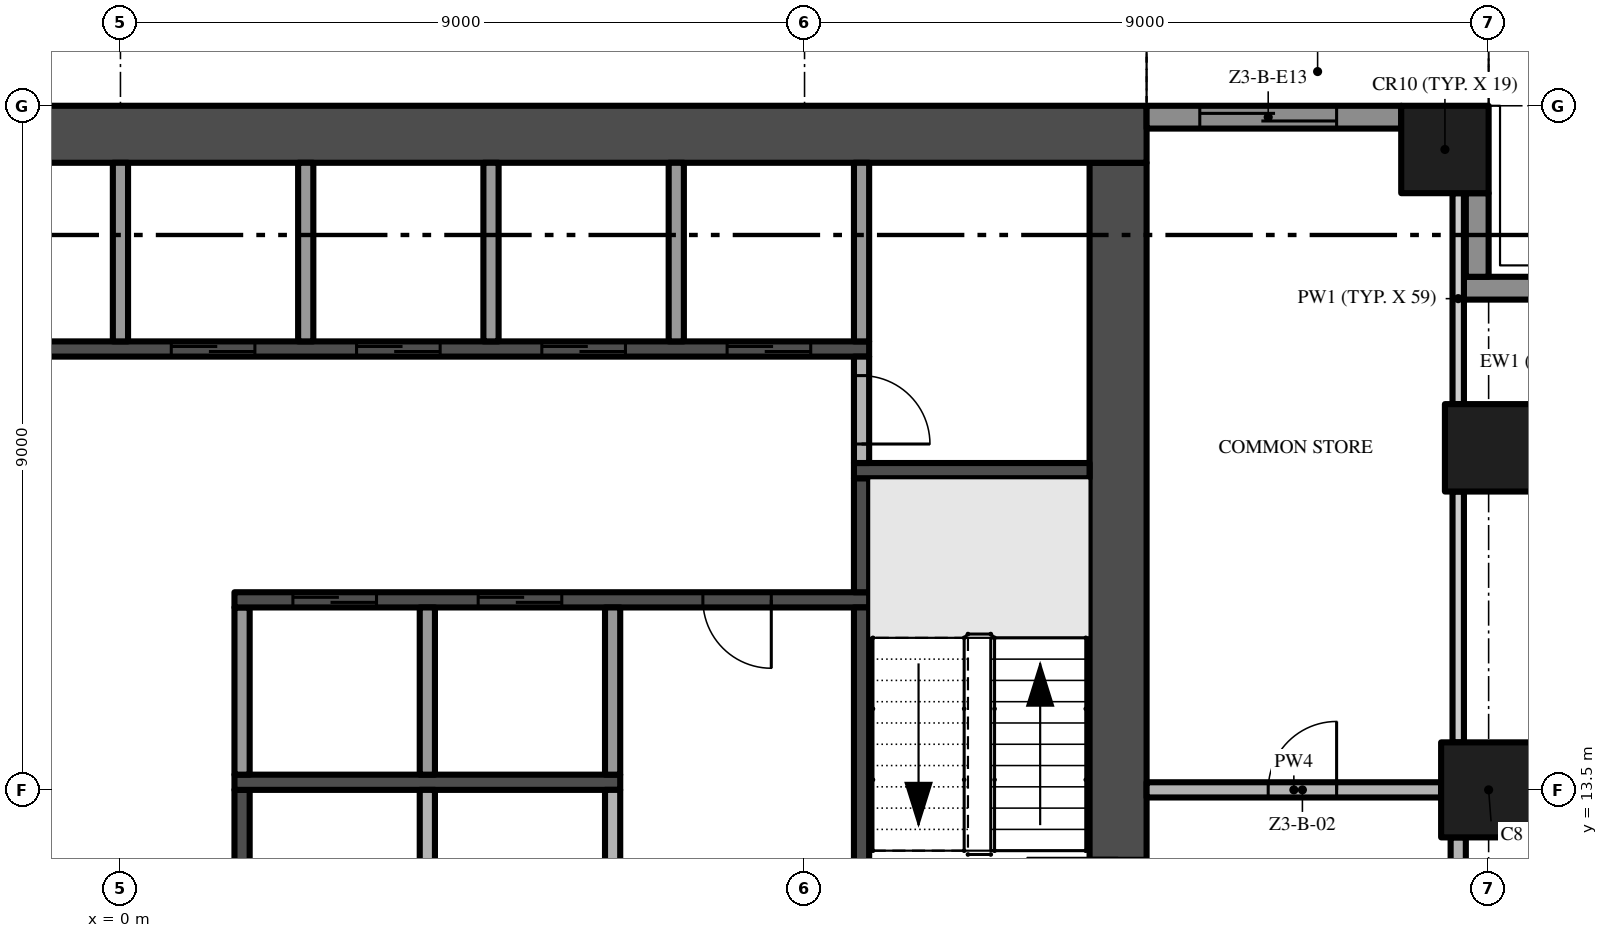
"""IFC4 building model, lengths in metres.
Left out: names, types, materials, properties, quantities, classifications, styles, units other than length and angle.
Written with IfcOpenShell. Run it as: python <this file> out.ifc"""

import sys

from ifc_helpers import new_model, si_unit, direction, frame, frame_2d, origin, origin_2d, place, context, subcontext, project, spatial, rectangle, extrude, element, fill, save


model = new_model("IFC4")
c1 = context("Model", 3, precision=1e-05, world=origin(), true_north=direction((0.0, 1.0)))
c2 = subcontext(c1, "Body", "Model", "MODEL_VIEW")
j1 = project(units=[si_unit("LENGTHUNIT", "METRE"), si_unit("PLANEANGLEUNIT", "RADIAN")], contexts=[c1])
p1 = place(None, origin())
s1 = spatial("IfcSite", under=j1, at=p1, CompositionType="ELEMENT")
p2 = place(p1, origin())
s2 = spatial("IfcBuilding", under=s1, at=p2, CompositionType="ELEMENT")
p3 = place(p2, frame((0.0, 0.0, 140.2)))
s3 = spatial("IfcBuildingStorey", under=s2, at=p3, CompositionType="ELEMENT", Elevation=140.2)
p4 = place(p3, frame((13.125, 5.25, -0.3), z_axis=(0.0, 0.0, 1.0), x_axis=(0.0, 1.0, 0.0)))
e1 = element("IfcWall", 1, at=p4, inside=s3, PredefinedType="SHEAR", context=c2, shape_type="SweptSolid", body=[
    extrude(rectangle(XDim=16.5, YDim=0.75, at=frame_2d((8.25, 0.0))), origin(), (0.0, 0.0, 1.0), 3.8),
])
p5 = place(p4, frame((6.15, 0.0, 0.3)))
e2 = element("IfcOpeningElement", 2, at=p5, cuts=e1, PredefinedType="OPENING", context=c2, shape_type="SweptSolid", body=[
    extrude(rectangle(XDim=1.2, YDim=2.2, at=frame_2d((0.6, 1.1))), frame((0.0, 0.385, 0.0), z_axis=(0.0, -1.0, 0.0), x_axis=(1.0, 0.0, 0.0)), (0.0, 0.0, 1.0), 0.77),
])
p6 = place(p3, frame((13.5, 22.125, -0.3), z_axis=(0.0, 0.0, 1.0), x_axis=(-1.0, 0.0, 0.0)))
e3 = element("IfcWall", 3, at=p6, inside=s3, PredefinedType="SHEAR", context=c2, shape_type="SweptSolid", body=[
    extrude(rectangle(XDim=27.0, YDim=0.75, at=frame_2d((13.5, 0.0))), origin(), (0.0, 0.0, 1.0), 3.8),
])
p7 = place(p3, frame((18.0, 13.5, 0.0), z_axis=(0.0, 0.0, 1.0), x_axis=(1.0, 0.0, 0.0)))
e4 = element("IfcColumn", 4, at=p7, inside=s3, PredefinedType="COLUMN", context=c2, shape_type="SweptSolid", body=[
    extrude(rectangle(XDim=1.25, YDim=1.25, at=origin_2d()), origin(), (0.0, 0.0, 1.0), 3.5),
])
for number, where, z_axis, x_axis in (
    (5, (17.425, 21.925, 0.0), (0.0, 0.0, 1.0), (1.0, 0.0, 0.0)),
    (6, (18.0, 18.0, 0.0), (0.0, 0.0, 1.0), (1.0, 0.0, 0.0)),
):
    element("IfcColumn", number, at=place(p3, frame(where, z_axis=z_axis, x_axis=x_axis)), inside=s3, PredefinedType="COLUMN", context=c2, shape_type="SweptSolid", body=[
        extrude(rectangle(XDim=1.15, YDim=1.15, at=origin_2d()), origin(), (0.0, 0.0, 1.0), 3.5),
    ])
p8 = place(p3, frame((17.6, 20.1, 0.0), z_axis=(0.0, 0.0, 1.0), x_axis=(1.0, 0.0, 0.0)))
e7 = element("IfcWall", 7, at=p8, inside=s3, PredefinedType="SOLIDWALL", context=c2, shape_type="SweptSolid", body=[
    extrude(rectangle(XDim=2.35, YDim=0.3, at=frame_2d((1.175, 0.0))), origin(), (0.0, 0.0, 1.0), 3.5),
])
p9 = place(p3, frame((17.85, 21.35, 0.0), z_axis=(0.0, 0.0, 1.0), x_axis=(0.0, -1.0, 0.0)))
e8 = element("IfcWall", 8, at=p9, inside=s3, PredefinedType="SOLIDWALL", context=c2, shape_type="SweptSolid", body=[
    extrude(rectangle(XDim=1.1, YDim=0.3, at=frame_2d((0.55, 0.0))), origin(), (0.0, 0.0, 1.0), 3.5),
])
p10 = place(p3, frame((13.5, 22.35, 0.0), z_axis=(0.0, 0.0, 1.0), x_axis=(1.0, 0.0, 0.0)))
e9 = element("IfcWall", 9, at=p10, inside=s3, PredefinedType="SOLIDWALL", context=c2, shape_type="SweptSolid", body=[
    extrude(rectangle(XDim=3.35, YDim=0.3, at=frame_2d((1.675, 0.0))), origin(), (0.0, 0.0, 1.0), 3.5),
])
p11 = place(p10, frame((0.7, 0.0, 0.0)))
e10 = element("IfcOpeningElement", 10, at=p11, cuts=e9, PredefinedType="OPENING", context=c2, shape_type="SweptSolid", body=[
    extrude(rectangle(XDim=1.8, YDim=2.4, at=frame_2d((0.9, 1.2))), frame((0.0, 0.16, 0.0), z_axis=(0.0, -1.0, 0.0), x_axis=(1.0, 0.0, 0.0)), (0.0, 0.0, 1.0), 0.32),
])
p12 = place(p3, frame((-9.85, 19.3, 0.0), z_axis=(0.0, 0.0, 1.0), x_axis=(1.0, 0.0, 0.0)))
e11 = element("IfcWall", 11, at=p12, inside=s3, PredefinedType="SHEAR", context=c2, shape_type="SweptSolid", body=[
    extrude(rectangle(XDim=19.7, YDim=0.2, at=frame_2d((9.85, 0.0))), origin(), (0.0, 0.0, 1.0), 3.5),
])
p13 = place(p12, frame((10.519, 0.0, 0.0)))
e12 = element("IfcOpeningElement", 12, at=p13, cuts=e11, PredefinedType="OPENING", context=c2, shape_type="SweptSolid", body=[
    extrude(rectangle(XDim=1.1, YDim=2.1, at=frame_2d((0.55, 1.05))), frame((0.0, 0.11, 0.0), z_axis=(0.0, -1.0, 0.0), x_axis=(1.0, 0.0, 0.0)), (0.0, 0.0, 1.0), 0.22),
])
p14 = place(p12, frame((12.956, 0.0, 0.0)))
e13 = element("IfcOpeningElement", 13, at=p14, cuts=e11, PredefinedType="OPENING", context=c2, shape_type="SweptSolid", body=[
    extrude(rectangle(XDim=1.1, YDim=2.1, at=frame_2d((0.55, 1.05))), frame((0.0, 0.11, 0.0), z_axis=(0.0, -1.0, 0.0), x_axis=(1.0, 0.0, 0.0)), (0.0, 0.0, 1.0), 0.22),
])
p15 = place(p12, frame((15.394, 0.0, 0.0)))
e14 = element("IfcOpeningElement", 14, at=p15, cuts=e11, PredefinedType="OPENING", context=c2, shape_type="SweptSolid", body=[
    extrude(rectangle(XDim=1.1, YDim=2.1, at=frame_2d((0.55, 1.05))), frame((0.0, 0.11, 0.0), z_axis=(0.0, -1.0, 0.0), x_axis=(1.0, 0.0, 0.0)), (0.0, 0.0, 1.0), 0.22),
])
p16 = place(p12, frame((17.831, 0.0, 0.0)))
e15 = element("IfcOpeningElement", 15, at=p16, cuts=e11, PredefinedType="OPENING", context=c2, shape_type="SweptSolid", body=[
    extrude(rectangle(XDim=1.1, YDim=2.1, at=frame_2d((0.55, 1.05))), frame((0.0, 0.11, 0.0), z_axis=(0.0, -1.0, 0.0), x_axis=(1.0, 0.0, 0.0)), (0.0, 0.0, 1.0), 0.22),
])
p17 = place(p12, frame((2.087, 0.0, 0.0)))
e16 = element("IfcOpeningElement", 16, at=p17, cuts=e11, PredefinedType="OPENING", context=c2, shape_type="SweptSolid", body=[
    extrude(rectangle(XDim=0.9, YDim=2.1, at=frame_2d((0.45, 1.05))), frame((0.0, 0.11, 0.0), z_axis=(0.0, -1.0, 0.0), x_axis=(1.0, 0.0, 0.0)), (0.0, 0.0, 1.0), 0.22),
])
p18 = place(p12, frame((6.963, 0.0, 0.0)))
e17 = element("IfcOpeningElement", 17, at=p18, cuts=e11, PredefinedType="OPENING", context=c2, shape_type="SweptSolid", body=[
    extrude(rectangle(XDim=0.9, YDim=2.1, at=frame_2d((0.45, 1.05))), frame((0.0, 0.11, 0.0), z_axis=(0.0, -1.0, 0.0), x_axis=(1.0, 0.0, 0.0)), (0.0, 0.0, 1.0), 0.22),
])
p19 = place(p3, frame((0.0, 19.4, 0.0), z_axis=(0.0, 0.0, 1.0), x_axis=(0.0, 1.0, 0.0)))
e18 = element("IfcWall", 18, at=p19, inside=s3, PredefinedType="PARTITIONING", context=c2, shape_type="SweptSolid", body=[
    extrude(rectangle(XDim=2.35, YDim=0.2, at=frame_2d((1.175, 0.0))), origin(), (0.0, 0.0, 1.0), 3.5),
])
p20 = place(p3, frame((1.6, 13.5, 0.0), z_axis=(0.0, 0.0, 1.0), x_axis=(0.0, -1.0, 0.0)))
e19 = element("IfcWall", 19, at=p20, inside=s3, PredefinedType="SHEAR", context=c2, shape_type="SweptSolid", body=[
    extrude(rectangle(XDim=3.5, YDim=0.2, at=frame_2d((1.75, 0.0))), origin(), (0.0, 0.0, 1.0), 3.5),
])
p21 = place(p20, frame((1.3, 0.0, 0.0)))
e20 = element("IfcOpeningElement", 20, at=p21, cuts=e19, PredefinedType="OPENING", context=c2, shape_type="SweptSolid", body=[
    extrude(rectangle(XDim=0.9, YDim=2.1, at=frame_2d((0.45, 1.05))), frame((0.0, 0.11, 0.0), z_axis=(0.0, -1.0, 0.0), x_axis=(1.0, 0.0, 0.0)), (0.0, 0.0, 1.0), 0.22),
])
p22 = place(p3, frame((1.5, 13.6, 0.0), z_axis=(0.0, 0.0, 1.0), x_axis=(1.0, 0.0, 0.0)))
e21 = element("IfcWall", 21, at=p22, inside=s3, PredefinedType="SHEAR", context=c2, shape_type="SweptSolid", body=[
    extrude(rectangle(XDim=5.075, YDim=0.2, at=frame_2d((2.538, 0.0))), origin(), (0.0, 0.0, 1.0), 3.5),
])
p23 = place(p3, frame((1.6, 13.7, 0.0), z_axis=(0.0, 0.0, 1.0), x_axis=(0.0, 1.0, 0.0)))
e22 = element("IfcWall", 22, at=p23, inside=s3, PredefinedType="PARTITIONING", context=c2, shape_type="SweptSolid", body=[
    extrude(rectangle(XDim=2.2, YDim=0.2, at=frame_2d((1.1, 0.0))), origin(), (0.0, 0.0, 1.0), 3.5),
])
p24 = place(p3, frame((9.85, 16.0, 0.0), z_axis=(0.0, 0.0, 1.0), x_axis=(-1.0, 0.0, 0.0)))
e23 = element("IfcWall", 23, at=p24, inside=s3, PredefinedType="SHEAR", context=c2, shape_type="SweptSolid", body=[
    extrude(rectangle(XDim=8.35, YDim=0.2, at=frame_2d((4.175, 0.0))), origin(), (0.0, 0.0, 1.0), 3.5),
])
p25 = place(p24, frame((6.481, 0.0, 0.0)))
e24 = element("IfcOpeningElement", 24, at=p25, cuts=e23, PredefinedType="OPENING", context=c2, shape_type="SweptSolid", body=[
    extrude(rectangle(XDim=1.1, YDim=2.1, at=frame_2d((0.55, 1.05))), frame((0.0, 0.11, 0.0), z_axis=(0.0, -1.0, 0.0), x_axis=(1.0, 0.0, 0.0)), (0.0, 0.0, 1.0), 0.22),
])
p26 = place(p24, frame((4.044, 0.0, 0.0)))
e25 = element("IfcOpeningElement", 25, at=p26, cuts=e23, PredefinedType="OPENING", context=c2, shape_type="SweptSolid", body=[
    extrude(rectangle(XDim=1.1, YDim=2.1, at=frame_2d((0.55, 1.05))), frame((0.0, 0.11, 0.0), z_axis=(0.0, -1.0, 0.0), x_axis=(1.0, 0.0, 0.0)), (0.0, 0.0, 1.0), 0.22),
])
p27 = place(p24, frame((1.288, 0.0, 0.0)))
e26 = element("IfcOpeningElement", 26, at=p27, cuts=e23, PredefinedType="OPENING", context=c2, shape_type="SweptSolid", body=[
    extrude(rectangle(XDim=0.9, YDim=2.1, at=frame_2d((0.45, 1.05))), frame((0.0, 0.11, 0.0), z_axis=(0.0, -1.0, 0.0), x_axis=(1.0, 0.0, 0.0)), (0.0, 0.0, 1.0), 0.22),
])
p28 = place(p3, frame((2.438, 19.4, 0.0), z_axis=(0.0, 0.0, 1.0), x_axis=(0.0, 1.0, 0.0)))
e27 = element("IfcWall", 27, at=p28, inside=s3, PredefinedType="PARTITIONING", context=c2, shape_type="SweptSolid", body=[
    extrude(rectangle(XDim=2.35, YDim=0.2, at=frame_2d((1.175, 0.0))), origin(), (0.0, 0.0, 1.0), 3.5),
])
p29 = place(p3, frame((4.037, 10.0, 0.0), z_axis=(0.0, 0.0, 1.0), x_axis=(0.0, 1.0, 0.0)))
e28 = element("IfcWall", 28, at=p29, inside=s3, PredefinedType="PARTITIONING", context=c2, shape_type="SweptSolid", body=[
    extrude(rectangle(XDim=3.5, YDim=0.2, at=frame_2d((1.75, 0.0))), origin(), (0.0, 0.0, 1.0), 3.5),
])
p30 = place(p3, frame((4.037, 13.7, 0.0), z_axis=(0.0, 0.0, 1.0), x_axis=(0.0, 1.0, 0.0)))
e29 = element("IfcWall", 29, at=p30, inside=s3, PredefinedType="PARTITIONING", context=c2, shape_type="SweptSolid", body=[
    extrude(rectangle(XDim=2.2, YDim=0.2, at=frame_2d((1.1, 0.0))), origin(), (0.0, 0.0, 1.0), 3.5),
])
p31 = place(p3, frame((4.875, 19.4, 0.0), z_axis=(0.0, 0.0, 1.0), x_axis=(0.0, 1.0, 0.0)))
e30 = element("IfcWall", 30, at=p31, inside=s3, PredefinedType="PARTITIONING", context=c2, shape_type="SweptSolid", body=[
    extrude(rectangle(XDim=2.35, YDim=0.2, at=frame_2d((1.175, 0.0))), origin(), (0.0, 0.0, 1.0), 3.5),
])
p32 = place(p3, frame((6.475, 12.3, 0.0), z_axis=(0.0, 0.0, 1.0), x_axis=(0.0, 1.0, 0.0)))
e31 = element("IfcWall", 31, at=p32, inside=s3, PredefinedType="PARTITIONING", context=c2, shape_type="SweptSolid", body=[
    extrude(rectangle(XDim=1.2, YDim=0.2, at=frame_2d((0.6, 0.0))), origin(), (0.0, 0.0, 1.0), 3.5),
])
p33 = place(p3, frame((6.475, 13.7, 0.0), z_axis=(0.0, 0.0, 1.0), x_axis=(0.0, 1.0, 0.0)))
e32 = element("IfcWall", 32, at=p33, inside=s3, PredefinedType="PARTITIONING", context=c2, shape_type="SweptSolid", body=[
    extrude(rectangle(XDim=2.2, YDim=0.2, at=frame_2d((1.1, 0.0))), origin(), (0.0, 0.0, 1.0), 3.5),
])
p34 = place(p3, frame((7.312, 19.4, 0.0), z_axis=(0.0, 0.0, 1.0), x_axis=(0.0, 1.0, 0.0)))
e33 = element("IfcWall", 33, at=p34, inside=s3, PredefinedType="PARTITIONING", context=c2, shape_type="SweptSolid", body=[
    extrude(rectangle(XDim=2.35, YDim=0.2, at=frame_2d((1.175, 0.0))), origin(), (0.0, 0.0, 1.0), 3.5),
])
p35 = place(p3, frame((9.75, 12.3, 0.0), z_axis=(0.0, 0.0, 1.0), x_axis=(0.0, 1.0, 0.0)))
e34 = element("IfcWall", 34, at=p35, inside=s3, PredefinedType="SHEAR", context=c2, shape_type="SweptSolid", body=[
    extrude(rectangle(XDim=3.6, YDim=0.2, at=frame_2d((1.8, 0.0))), origin(), (0.0, 0.0, 1.0), 3.5),
])
p36 = place(p3, frame((9.75, 16.1, 0.0), z_axis=(0.0, 0.0, 1.0), x_axis=(0.0, 1.0, 0.0)))
e35 = element("IfcWall", 35, at=p36, inside=s3, PredefinedType="SHEAR", context=c2, shape_type="SweptSolid", body=[
    extrude(rectangle(XDim=1.5, YDim=0.2, at=frame_2d((0.75, 0.0))), origin(), (0.0, 0.0, 1.0), 3.5),
])
p37 = place(p3, frame((9.65, 17.7, 0.0), z_axis=(0.0, 0.0, 1.0), x_axis=(1.0, 0.0, 0.0)))
e36 = element("IfcWall", 36, at=p37, inside=s3, PredefinedType="SHEAR", context=c2, shape_type="SweptSolid", body=[
    extrude(rectangle(XDim=3.1, YDim=0.2, at=frame_2d((1.55, 0.0))), origin(), (0.0, 0.0, 1.0), 3.5),
])
p38 = place(p3, frame((9.75, 19.2, 0.0), z_axis=(0.0, 0.0, 1.0), x_axis=(0.0, -1.0, 0.0)))
e37 = element("IfcWall", 37, at=p38, inside=s3, PredefinedType="PARTITIONING", context=c2, shape_type="SweptSolid", body=[
    extrude(rectangle(XDim=1.4, YDim=0.2, at=frame_2d((0.7, 0.0))), origin(), (0.0, 0.0, 1.0), 3.5),
])
p39 = place(p38, frame((0.25, 0.0, 0.0)))
e38 = element("IfcOpeningElement", 38, at=p39, cuts=e37, PredefinedType="OPENING", context=c2, shape_type="SweptSolid", body=[
    extrude(rectangle(XDim=0.9, YDim=2.1, at=frame_2d((0.45, 1.05))), frame((0.0, 0.11, 0.0), z_axis=(0.0, -1.0, 0.0), x_axis=(1.0, 0.0, 0.0)), (0.0, 0.0, 1.0), 0.22),
])
p40 = place(p3, frame((9.75, 19.4, 0.0), z_axis=(0.0, 0.0, 1.0), x_axis=(0.0, 1.0, 0.0)))
e39 = element("IfcWall", 39, at=p40, inside=s3, PredefinedType="PARTITIONING", context=c2, shape_type="SweptSolid", body=[
    extrude(rectangle(XDim=2.35, YDim=0.2, at=frame_2d((1.175, 0.0))), origin(), (0.0, 0.0, 1.0), 3.5),
])
p41 = place(p3, frame((13.5, 13.5, 0.0), z_axis=(0.0, 0.0, 1.0), x_axis=(1.0, 0.0, 0.0)))
e40 = element("IfcWall", 40, at=p41, inside=s3, PredefinedType="PARTITIONING", context=c2, shape_type="SweptSolid", body=[
    extrude(rectangle(XDim=3.875, YDim=0.2, at=frame_2d((1.938, 0.0))), origin(), (0.0, 0.0, 1.0), 3.5),
])
p42 = place(p41, frame((1.6, 0.0, 0.0)))
e41 = element("IfcOpeningElement", 41, at=p42, cuts=e40, PredefinedType="OPENING", context=c2, shape_type="SweptSolid", body=[
    extrude(rectangle(XDim=0.9, YDim=2.1, at=frame_2d((0.45, 1.05))), frame((0.0, 0.11, 0.0), z_axis=(0.0, -1.0, 0.0), x_axis=(1.0, 0.0, 0.0)), (0.0, 0.0, 1.0), 0.22),
])
p43 = place(p3, frame((17.6, 12.875, 0.0), z_axis=(0.0, 0.0, 1.0), x_axis=(0.0, -1.0, 0.0)))
e42 = element("IfcWall", 42, at=p43, inside=s3, PredefinedType="PARTITIONING", context=c2, shape_type="SweptSolid", body=[
    extrude(rectangle(XDim=7.75, YDim=0.2, at=frame_2d((3.875, 0.0))), origin(), (0.0, 0.0, 1.0), 3.5),
])
p44 = place(p43, frame((5.55, 0.0, 0.0)))
e43 = element("IfcOpeningElement", 43, at=p44, cuts=e42, PredefinedType="OPENING", context=c2, shape_type="SweptSolid", body=[
    extrude(rectangle(XDim=1.2, YDim=2.4, at=frame_2d((0.6, 1.2))), frame((0.0, 0.11, 0.0), z_axis=(0.0, -1.0, 0.0), x_axis=(1.0, 0.0, 0.0)), (0.0, 0.0, 1.0), 0.22),
])
p45 = place(p3, frame((17.6, 14.125, 0.0), z_axis=(0.0, 0.0, 1.0), x_axis=(0.0, 1.0, 0.0)))
e44 = element("IfcWall", 44, at=p45, inside=s3, PredefinedType="PARTITIONING", context=c2, shape_type="SweptSolid", body=[
    extrude(rectangle(XDim=3.3, YDim=0.15, at=frame_2d((1.65, 0.0))), origin(), (0.0, 0.0, 1.0), 3.5),
])
p46 = place(p3, frame((17.6, 18.575, 0.0), z_axis=(0.0, 0.0, 1.0), x_axis=(0.0, 1.0, 0.0)))
e45 = element("IfcWall", 45, at=p46, inside=s3, PredefinedType="PARTITIONING", context=c2, shape_type="SweptSolid", body=[
    extrude(rectangle(XDim=2.775, YDim=0.15, at=frame_2d((1.387, 0.0))), origin(), (0.0, 0.0, 1.0), 3.5),
])
p47 = place(p11, origin())
e46 = element("IfcDoor", 46, at=p47, inside=s3, OperationType="SINGLE_SWING_LEFT", PredefinedType="DOOR", context=c2, shape_type="SweptSolid", body=[
    extrude(rectangle(XDim=1.8, YDim=2.4, at=frame_2d((0.9, 1.2))), frame((0.0, 0.025, 0.0), z_axis=(0.0, -1.0, 0.0), x_axis=(1.0, 0.0, 0.0)), (0.0, 0.0, 1.0), 0.05),
])
fill(e10, e46)
p48 = place(p13, origin())
e47 = element("IfcDoor", 47, at=p48, inside=s3, OperationType="SLIDING_TO_RIGHT", PredefinedType="DOOR", context=c2, shape_type="SweptSolid", body=[
    extrude(rectangle(XDim=1.1, YDim=2.1, at=frame_2d((0.55, 1.05))), frame((0.0, 0.025, 0.0), z_axis=(0.0, -1.0, 0.0), x_axis=(1.0, 0.0, 0.0)), (0.0, 0.0, 1.0), 0.05),
])
fill(e12, e47)
p49 = place(p14, origin())
e48 = element("IfcDoor", 48, at=p49, inside=s3, OperationType="SLIDING_TO_RIGHT", PredefinedType="DOOR", context=c2, shape_type="SweptSolid", body=[
    extrude(rectangle(XDim=1.1, YDim=2.1, at=frame_2d((0.55, 1.05))), frame((0.0, 0.025, 0.0), z_axis=(0.0, -1.0, 0.0), x_axis=(1.0, 0.0, 0.0)), (0.0, 0.0, 1.0), 0.05),
])
fill(e13, e48)
p50 = place(p15, origin())
e49 = element("IfcDoor", 49, at=p50, inside=s3, OperationType="SLIDING_TO_RIGHT", PredefinedType="DOOR", context=c2, shape_type="SweptSolid", body=[
    extrude(rectangle(XDim=1.1, YDim=2.1, at=frame_2d((0.55, 1.05))), frame((0.0, 0.025, 0.0), z_axis=(0.0, -1.0, 0.0), x_axis=(1.0, 0.0, 0.0)), (0.0, 0.0, 1.0), 0.05),
])
fill(e14, e49)
p51 = place(p16, origin())
e50 = element("IfcDoor", 50, at=p51, inside=s3, OperationType="SLIDING_TO_RIGHT", PredefinedType="DOOR", context=c2, shape_type="SweptSolid", body=[
    extrude(rectangle(XDim=1.1, YDim=2.1, at=frame_2d((0.55, 1.05))), frame((0.0, 0.025, 0.0), z_axis=(0.0, -1.0, 0.0), x_axis=(1.0, 0.0, 0.0)), (0.0, 0.0, 1.0), 0.05),
])
fill(e15, e50)
p52 = place(p25, origin())
e51 = element("IfcDoor", 51, at=p52, inside=s3, OperationType="SLIDING_TO_RIGHT", PredefinedType="DOOR", context=c2, shape_type="SweptSolid", body=[
    extrude(rectangle(XDim=1.1, YDim=2.1, at=frame_2d((0.55, 1.05))), frame((0.0, 0.025, 0.0), z_axis=(0.0, -1.0, 0.0), x_axis=(1.0, 0.0, 0.0)), (0.0, 0.0, 1.0), 0.05),
])
fill(e24, e51)
p53 = place(p26, origin())
e52 = element("IfcDoor", 52, at=p53, inside=s3, OperationType="SLIDING_TO_RIGHT", PredefinedType="DOOR", context=c2, shape_type="SweptSolid", body=[
    extrude(rectangle(XDim=1.1, YDim=2.1, at=frame_2d((0.55, 1.05))), frame((0.0, 0.025, 0.0), z_axis=(0.0, -1.0, 0.0), x_axis=(1.0, 0.0, 0.0)), (0.0, 0.0, 1.0), 0.05),
])
fill(e25, e52)
p54 = place(p27, origin())
e53 = element("IfcDoor", 53, at=p54, inside=s3, OperationType="SINGLE_SWING_LEFT", PredefinedType="DOOR", context=c2, shape_type="SweptSolid", body=[
    extrude(rectangle(XDim=0.9, YDim=2.1, at=frame_2d((0.45, 1.05))), frame((0.0, 0.025, 0.0), z_axis=(0.0, -1.0, 0.0), x_axis=(1.0, 0.0, 0.0)), (0.0, 0.0, 1.0), 0.05),
])
fill(e26, e53)
p55 = place(p39, origin())
e54 = element("IfcDoor", 54, at=p55, inside=s3, OperationType="SINGLE_SWING_RIGHT", PredefinedType="DOOR", context=c2, shape_type="SweptSolid", body=[
    extrude(rectangle(XDim=0.9, YDim=2.1, at=frame_2d((0.45, 1.05))), frame((0.0, 0.025, 0.0), z_axis=(0.0, -1.0, 0.0), x_axis=(1.0, 0.0, 0.0)), (0.0, 0.0, 1.0), 0.05),
])
fill(e38, e54)
p56 = place(p42, origin())
e55 = element("IfcDoor", 55, at=p56, inside=s3, OperationType="SINGLE_SWING_RIGHT", PredefinedType="DOOR", context=c2, shape_type="SweptSolid", body=[
    extrude(rectangle(XDim=0.9, YDim=2.1, at=frame_2d((0.45, 1.05))), frame((0.0, 0.025, 0.0), z_axis=(0.0, -1.0, 0.0), x_axis=(1.0, 0.0, 0.0)), (0.0, 0.0, 1.0), 0.05),
])
fill(e41, e55)
save(model, sys.argv[1])
